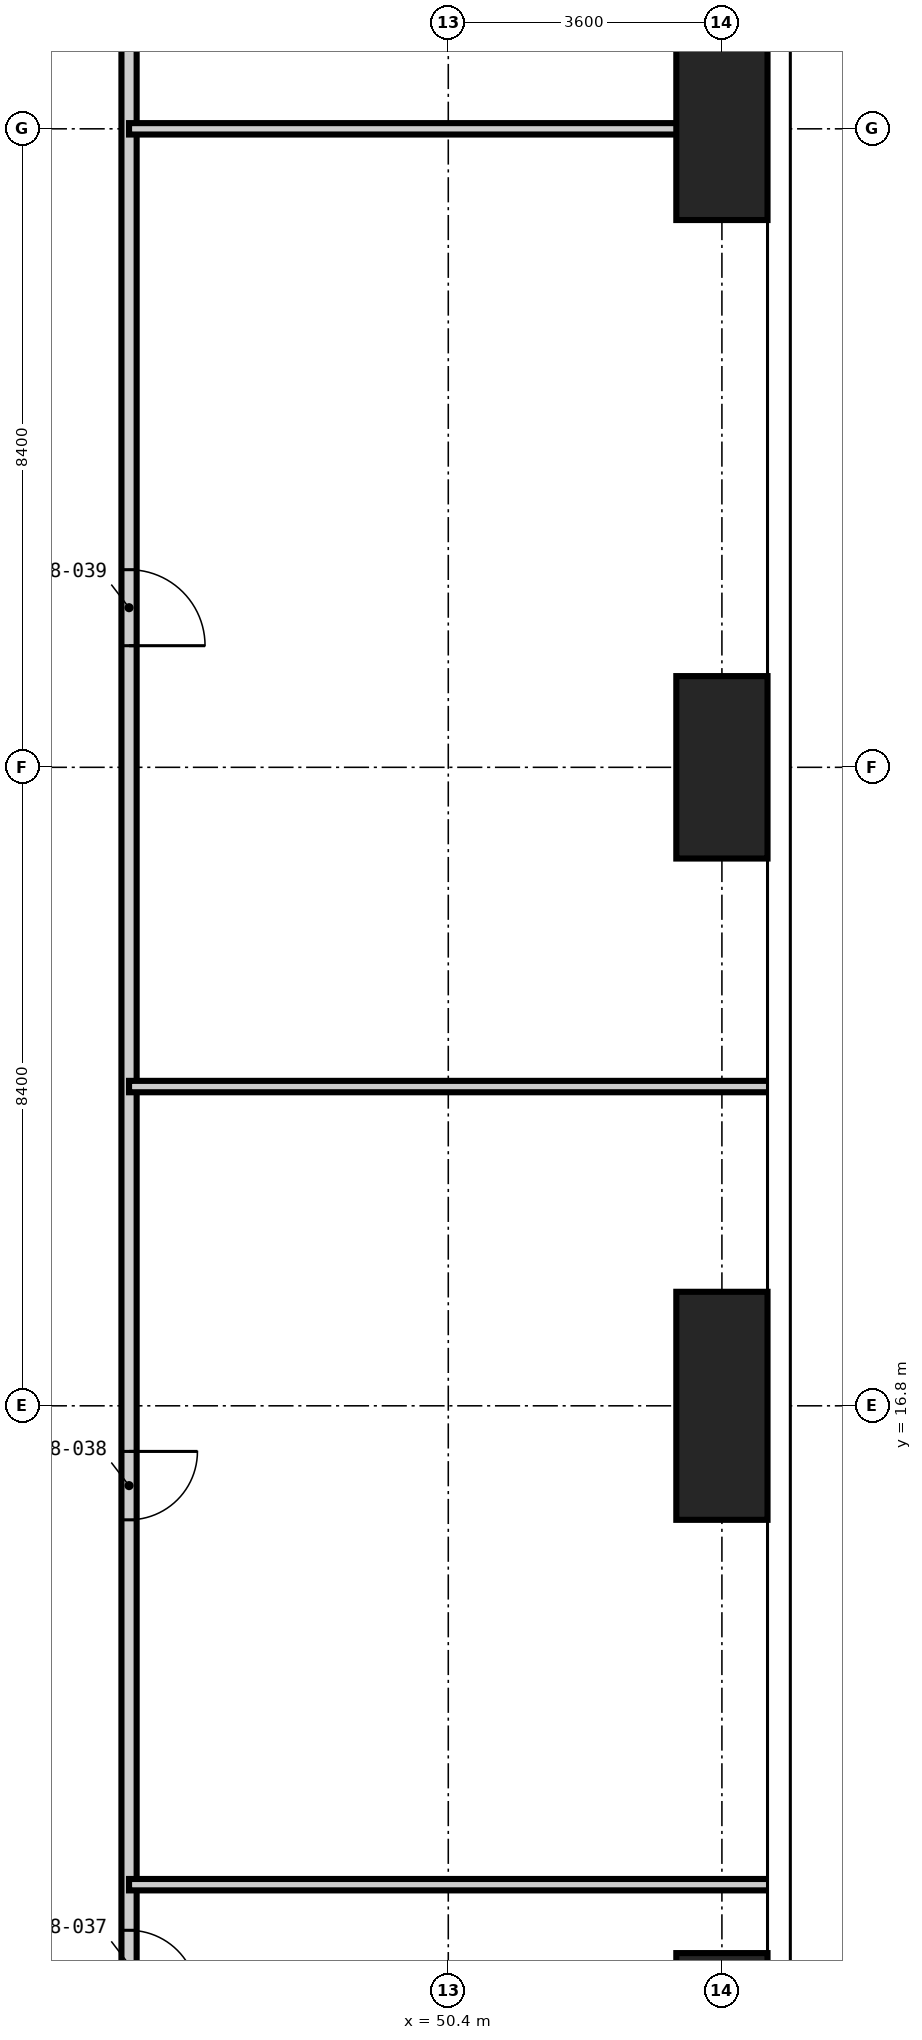
"""IFC4 building model, lengths in metres.
Left out: names, types, materials, properties, quantities, classifications, styles, units other than length and angle.
Written with IfcOpenShell. Run it as: python <this file> out.ifc"""

import sys

from ifc_helpers import new_model, si_unit, direction, frame, frame_2d, origin, origin_2d, place, context, subcontext, project, spatial, rectangle, extrude, element, fill, save


model = new_model("IFC4")
c1 = context("Model", 3, precision=1e-05, world=origin(), true_north=direction((0.0, 1.0)))
c2 = subcontext(c1, "Body", "Model", "MODEL_VIEW")
j1 = project(units=[si_unit("LENGTHUNIT", "METRE"), si_unit("PLANEANGLEUNIT", "RADIAN")], contexts=[c1])
p1 = place(None, origin())
s1 = spatial("IfcSite", under=j1, at=p1, CompositionType="ELEMENT")
p2 = place(p1, origin())
s2 = spatial("IfcBuilding", under=s1, at=p2, CompositionType="ELEMENT")
p3 = place(p2, frame((0.0, 0.0, 147.6)))
s3 = spatial("IfcBuildingStorey", under=s2, at=p3, CompositionType="ELEMENT", Elevation=147.6)
p4 = place(p3, frame((54.0, 8.4, -0.35), z_axis=(0.0, 0.0, 1.0), x_axis=(1.0, 0.0, 0.0)))
e1 = element("IfcColumn", 1, at=p4, inside=s3, PredefinedType="COLUMN", context=c2, shape_type="SweptSolid", body=[
    extrude(rectangle(XDim=1.2, YDim=2.4, at=origin_2d()), origin(), (0.0, 0.0, 1.0), 5.95),
])
p5 = place(p3, frame((54.0, 16.8, -0.35), z_axis=(0.0, 0.0, 1.0), x_axis=(1.0, 0.0, 0.0)))
e2 = element("IfcColumn", 2, at=p5, inside=s3, PredefinedType="COLUMN", context=c2, shape_type="SweptSolid", body=[
    extrude(rectangle(XDim=1.2, YDim=3.0, at=origin_2d()), origin(), (0.0, 0.0, 1.0), 5.95),
])
for number, where, z_axis, x_axis in (
    (3, (54.0, 25.2, -0.35), (0.0, 0.0, 1.0), (1.0, 0.0, 0.0)),
    (4, (54.0, 33.6, -0.35), (0.0, 0.0, 1.0), (1.0, 0.0, 0.0)),
):
    element("IfcColumn", number, at=place(p3, frame(where, z_axis=z_axis, x_axis=x_axis)), inside=s3, PredefinedType="COLUMN", context=c2, shape_type="SweptSolid", body=[
        extrude(rectangle(XDim=1.2, YDim=2.4, at=origin_2d()), origin(), (0.0, 0.0, 1.0), 5.95),
    ])
p6 = place(p3, frame((46.2, 8.4, 0.0), z_axis=(0.0, 0.0, 1.0), x_axis=(0.0, 1.0, 0.0)))
e5 = element("IfcWall", 5, at=p6, inside=s3, PredefinedType="PARTITIONING", context=c2, shape_type="SweptSolid", body=[
    extrude(rectangle(XDim=29.4, YDim=0.2, at=frame_2d((14.7, 0.0))), origin(), (0.0, 0.0, 1.0), 5.6),
])
p7 = place(p6, frame((0.6, 0.0, 0.0)))
e6 = element("IfcOpeningElement", 6, at=p7, cuts=e5, PredefinedType="OPENING", context=c2, shape_type="SweptSolid", body=[
    extrude(rectangle(XDim=0.9, YDim=2.1, at=frame_2d((0.45, 1.05))), frame((0.0, 0.11, 0.0), z_axis=(0.0, -1.0, 0.0), x_axis=(1.0, 0.0, 0.0)), (0.0, 0.0, 1.0), 0.22),
])
p8 = place(p6, frame((6.9, 0.0, 0.0)))
e7 = element("IfcOpeningElement", 7, at=p8, cuts=e5, PredefinedType="OPENING", context=c2, shape_type="SweptSolid", body=[
    extrude(rectangle(XDim=0.9, YDim=2.1, at=frame_2d((0.45, 1.05))), frame((0.0, 0.11, 0.0), z_axis=(0.0, -1.0, 0.0), x_axis=(1.0, 0.0, 0.0)), (0.0, 0.0, 1.0), 0.22),
])
p9 = place(p6, frame((18.4, 0.0, 0.0)))
e8 = element("IfcOpeningElement", 8, at=p9, cuts=e5, PredefinedType="OPENING", context=c2, shape_type="SweptSolid", body=[
    extrude(rectangle(XDim=1.0, YDim=2.1, at=frame_2d((0.5, 1.05))), frame((0.0, 0.11, 0.0), z_axis=(0.0, -1.0, 0.0), x_axis=(1.0, 0.0, 0.0)), (0.0, 0.0, 1.0), 0.22),
])
p10 = place(p6, frame((26.8, 0.0, 0.0)))
e9 = element("IfcOpeningElement", 9, at=p10, cuts=e5, PredefinedType="OPENING", context=c2, shape_type="SweptSolid", body=[
    extrude(rectangle(XDim=1.0, YDim=2.1, at=frame_2d((0.5, 1.05))), frame((0.0, 0.11, 0.0), z_axis=(0.0, -1.0, 0.0), x_axis=(1.0, 0.0, 0.0)), (0.0, 0.0, 1.0), 0.22),
])
for number, where, z_axis, x_axis in (
    (10, (46.2, 10.5, 0.0), (0.0, 0.0, 1.0), (1.0, 0.0, 0.0)),
    (11, (46.2, 21.0, 0.0), (0.0, 0.0, 1.0), (1.0, 0.0, 0.0)),
    (12, (46.2, 33.6, 0.0), (0.0, 0.0, 1.0), (1.0, 0.0, 0.0)),
):
    element("IfcWall", number, at=place(p3, frame(where, z_axis=z_axis, x_axis=x_axis)), inside=s3, PredefinedType="PARTITIONING", context=c2, shape_type="SweptSolid", body=[
        extrude(rectangle(XDim=8.438, YDim=0.15, at=frame_2d((4.219, 0.0))), origin(), (0.0, 0.0, 1.0), 5.6),
    ])
p11 = place(p7, frame((0.9, 0.0, 0.0), z_axis=(0.0, 0.0, 1.0), x_axis=(-1.0, 0.0, 0.0)))
e13 = element("IfcDoor", 13, at=p11, inside=s3, OperationType="SINGLE_SWING_RIGHT", PredefinedType="DOOR", context=c2, shape_type="SweptSolid", body=[
    extrude(rectangle(XDim=0.9, YDim=2.1, at=frame_2d((0.45, 1.05))), frame((0.0, 0.025, 0.0), z_axis=(0.0, -1.0, 0.0), x_axis=(1.0, 0.0, 0.0)), (0.0, 0.0, 1.0), 0.05),
])
fill(e6, e13)
p12 = place(p8, frame((0.9, 0.0, 0.0), z_axis=(0.0, 0.0, 1.0), x_axis=(-1.0, 0.0, 0.0)))
e14 = element("IfcDoor", 14, at=p12, inside=s3, OperationType="SINGLE_SWING_LEFT", PredefinedType="DOOR", context=c2, shape_type="SweptSolid", body=[
    extrude(rectangle(XDim=0.9, YDim=2.1, at=frame_2d((0.45, 1.05))), frame((0.0, 0.025, 0.0), z_axis=(0.0, -1.0, 0.0), x_axis=(1.0, 0.0, 0.0)), (0.0, 0.0, 1.0), 0.05),
])
fill(e7, e14)
p13 = place(p9, frame((1.0, 0.0, 0.0), z_axis=(0.0, 0.0, 1.0), x_axis=(-1.0, 0.0, 0.0)))
e15 = element("IfcDoor", 15, at=p13, inside=s3, OperationType="SINGLE_SWING_RIGHT", PredefinedType="DOOR", context=c2, shape_type="SweptSolid", body=[
    extrude(rectangle(XDim=1.0, YDim=2.1, at=frame_2d((0.5, 1.05))), frame((0.0, 0.025, 0.0), z_axis=(0.0, -1.0, 0.0), x_axis=(1.0, 0.0, 0.0)), (0.0, 0.0, 1.0), 0.05),
])
fill(e8, e15)
save(model, sys.argv[1])
